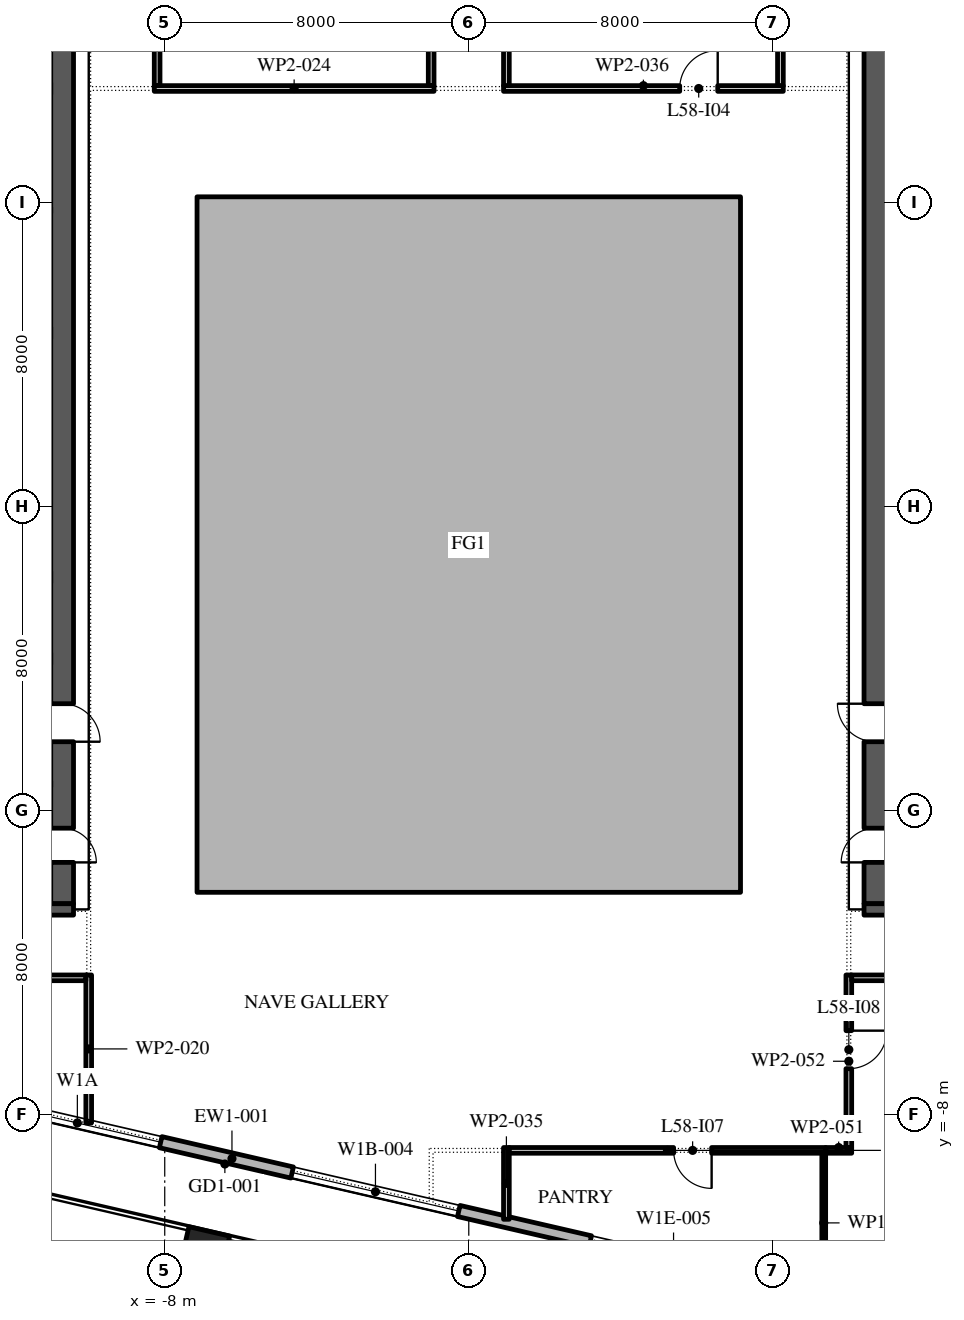
"""IFC4 building model, lengths in metres.
Left out: names, types, materials, properties, quantities, classifications, styles, units other than length and angle.
Written with IfcOpenShell. Run it as: python <this file> out.ifc"""

import sys

from ifc_helpers import new_model, si_unit, direction, frame, frame_2d, origin, origin_2d, place, context, subcontext, project, spatial, polyline, rectangle, outline, extrude, element, fill, save


model = new_model("IFC4")
c1 = context("Model", 3, precision=1e-05, world=origin(), true_north=direction((0.0, 1.0)))
c2 = subcontext(c1, "Body", "Model", "MODEL_VIEW")
j1 = project(units=[si_unit("LENGTHUNIT", "METRE"), si_unit("PLANEANGLEUNIT", "RADIAN")], contexts=[c1])
p1 = place(None, origin())
s1 = spatial("IfcSite", under=j1, at=p1, CompositionType="ELEMENT")
p2 = place(p1, origin())
s2 = spatial("IfcBuilding", under=s1, at=p2, CompositionType="ELEMENT")
p3 = place(p2, frame((0.0, 0.0, 268.2)))
s3 = spatial("IfcBuildingStorey", under=s2, at=p3, CompositionType="ELEMENT", Elevation=268.2)
p4 = place(p3, frame((-6.951, -11.608, 0.0), z_axis=(0.0, 0.0, 1.0), x_axis=(0.974370064785, -0.224951054344, 0.0)))
e1 = element("IfcColumn", 1, at=p4, inside=s3, PredefinedType="COLUMN", context=c2, shape_type="SweptSolid", body=[
    extrude(rectangle(XDim=1.1, YDim=1.1, at=origin_2d()), origin(), (0.0, 0.0, 1.0), 4.2),
])
p5 = place(p3, origin())
e2 = element("IfcWall", 2, at=p5, inside=s3, PredefinedType="STANDARD", context=c2, shape_type="SweptSolid", body=[
    extrude(outline(polyline([(-7.15, -2.15), (7.15, -2.15), (7.15, 16.15), (-7.15, 16.15), (-7.15, -2.15)]), holes=[polyline([(-7.0, -2.0), (-7.0, 16.0), (7.0, 16.0), (7.0, -2.0), (-7.0, -2.0)])]), origin(), (0.0, 0.0, 1.0), 4.0),
])
p6 = place(p3, frame((-29.616, -3.758, 0.0), z_axis=(0.0, 0.0, 1.0), x_axis=(0.974370532314, -0.224949029246, 0.0)))
e3 = element("IfcWall", 3, at=p6, inside=s3, PredefinedType="STANDARD", context=c2, shape_type="SweptSolid", body=[
    extrude(rectangle(XDim=48.0, YDim=0.3, at=frame_2d((24.0, 0.0))), origin(), (0.0, 0.0, 1.0), 4.0),
])
p7 = place(p6, frame((1.625, 0.0, 0.45)))
e4 = element("IfcOpeningElement", 4, at=p7, cuts=e3, PredefinedType="OPENING", context=c2, shape_type="SweptSolid", body=[
    extrude(rectangle(XDim=4.5, YDim=3.05, at=frame_2d((2.25, 1.525))), frame((0.0, 0.16, 0.0), z_axis=(0.0, -1.0, 0.0), x_axis=(1.0, 0.0, 0.0)), (0.0, 0.0, 1.0), 0.32),
])
p8 = place(p6, frame((10.575, 0.0, 0.0)))
e5 = element("IfcOpeningElement", 5, at=p8, cuts=e3, PredefinedType="OPENING", context=c2, shape_type="SweptSolid", body=[
    extrude(rectangle(XDim=2.4, YDim=3.5, at=frame_2d((1.2, 1.75))), frame((0.0, 0.16, 0.0), z_axis=(0.0, -1.0, 0.0), x_axis=(1.0, 0.0, 0.0)), (0.0, 0.0, 1.0), 0.32),
])
p9 = place(p6, frame((17.575, 0.0, 0.45)))
e6 = element("IfcOpeningElement", 6, at=p9, cuts=e3, PredefinedType="OPENING", context=c2, shape_type="SweptSolid", body=[
    extrude(rectangle(XDim=4.5, YDim=3.0, at=frame_2d((2.25, 1.5))), frame((0.0, 0.16, 0.0), z_axis=(0.0, -1.0, 0.0), x_axis=(1.0, 0.0, 0.0)), (0.0, 0.0, 1.0), 0.32),
])
p10 = place(p6, frame((25.625, 0.0, 0.45)))
e7 = element("IfcOpeningElement", 7, at=p10, cuts=e3, PredefinedType="OPENING", context=c2, shape_type="SweptSolid", body=[
    extrude(rectangle(XDim=4.5, YDim=2.95, at=frame_2d((2.25, 1.475))), frame((0.0, 0.16, 0.0), z_axis=(0.0, -1.0, 0.0), x_axis=(1.0, 0.0, 0.0)), (0.0, 0.0, 1.0), 0.32),
])
p11 = place(p6, frame((33.675, 0.0, 0.45)))
e8 = element("IfcOpeningElement", 8, at=p11, cuts=e3, PredefinedType="OPENING", context=c2, shape_type="SweptSolid", body=[
    extrude(rectangle(XDim=4.5, YDim=2.825, at=frame_2d((2.25, 1.413))), frame((0.0, 0.16, 0.0), z_axis=(0.0, -1.0, 0.0), x_axis=(1.0, 0.0, 0.0)), (0.0, 0.0, 1.0), 0.32),
])
p12 = place(p6, frame((42.175, 0.0, 0.0)))
e9 = element("IfcOpeningElement", 9, at=p12, cuts=e3, PredefinedType="OPENING", context=c2, shape_type="SweptSolid", body=[
    extrude(rectangle(XDim=2.4, YDim=3.5, at=frame_2d((1.2, 1.75))), frame((0.0, 0.16, 0.0), z_axis=(0.0, -1.0, 0.0), x_axis=(1.0, 0.0, 0.0)), (0.0, 0.0, 1.0), 0.32),
])
p13 = place(p3, frame((-10.7, -2.45, 0.0), z_axis=(0.0, 0.0, 1.0), x_axis=(0.0, 1.0, 0.0)))
e10 = element("IfcWall", 10, at=p13, inside=s3, PredefinedType="SHEAR", context=c2, shape_type="SweptSolid", body=[
    extrude(rectangle(XDim=27.9, YDim=0.6, at=frame_2d((13.95, 0.0))), origin(), (0.0, 0.0, 1.0), 4.0),
])
p14 = place(p13, frame((23.65, 0.0, 0.0)))
e11 = element("IfcOpeningElement", 11, at=p14, cuts=e10, PredefinedType="OPENING", context=c2, shape_type="SweptSolid", body=[
    extrude(rectangle(XDim=2.4, YDim=2.1, at=frame_2d((1.2, 1.05))), frame((0.0, 0.31, 0.0), z_axis=(0.0, -1.0, 0.0), x_axis=(1.0, 0.0, 0.0)), (0.0, 0.0, 1.0), 0.62),
])
p15 = place(p13, frame((1.087, 0.0, 0.0)))
e12 = element("IfcOpeningElement", 12, at=p15, cuts=e10, PredefinedType="OPENING", context=c2, shape_type="SweptSolid", body=[
    extrude(rectangle(XDim=0.9, YDim=2.1, at=frame_2d((0.45, 1.05))), frame((0.0, 0.31, 0.0), z_axis=(0.0, -1.0, 0.0), x_axis=(1.0, 0.0, 0.0)), (0.0, 0.0, 1.0), 0.62),
])
p16 = place(p13, frame((4.262, 0.0, 0.0)))
e13 = element("IfcOpeningElement", 13, at=p16, cuts=e10, PredefinedType="OPENING", context=c2, shape_type="SweptSolid", body=[
    extrude(rectangle(XDim=1.0, YDim=2.1, at=frame_2d((0.5, 1.05))), frame((0.0, 0.31, 0.0), z_axis=(0.0, -1.0, 0.0), x_axis=(1.0, 0.0, 0.0)), (0.0, 0.0, 1.0), 0.62),
])
p17 = place(p3, frame((-21.6, -2.6, 0.0), z_axis=(0.0, 0.0, 1.0), x_axis=(1.0, 0.0, 0.0)))
e14 = element("IfcWall", 14, at=p17, inside=s3, PredefinedType="SHEAR", context=c2, shape_type="SweptSolid", body=[
    extrude(rectangle(XDim=11.2, YDim=0.3, at=frame_2d((5.6, 0.0))), origin(), (0.0, 0.0, 1.0), 4.0),
])
p18 = place(p3, frame((10.7, -2.45, 0.0), z_axis=(0.0, 0.0, 1.0), x_axis=(0.0, 1.0, 0.0)))
e15 = element("IfcWall", 15, at=p18, inside=s3, PredefinedType="SHEAR", context=c2, shape_type="SweptSolid", body=[
    extrude(rectangle(XDim=27.9, YDim=0.6, at=frame_2d((13.95, 0.0))), origin(), (0.0, 0.0, 1.0), 4.0),
])
p19 = place(p18, frame((23.65, 0.0, 0.0)))
e16 = element("IfcOpeningElement", 16, at=p19, cuts=e15, PredefinedType="OPENING", context=c2, shape_type="SweptSolid", body=[
    extrude(rectangle(XDim=2.4, YDim=2.1, at=frame_2d((1.2, 1.05))), frame((0.0, 0.31, 0.0), z_axis=(0.0, -1.0, 0.0), x_axis=(1.0, 0.0, 0.0)), (0.0, 0.0, 1.0), 0.62),
])
p20 = place(p18, frame((1.087, 0.0, 0.0)))
e17 = element("IfcOpeningElement", 17, at=p20, cuts=e15, PredefinedType="OPENING", context=c2, shape_type="SweptSolid", body=[
    extrude(rectangle(XDim=0.9, YDim=2.1, at=frame_2d((0.45, 1.05))), frame((0.0, 0.31, 0.0), z_axis=(0.0, -1.0, 0.0), x_axis=(1.0, 0.0, 0.0)), (0.0, 0.0, 1.0), 0.62),
])
p21 = place(p18, frame((4.262, 0.0, 0.0)))
e18 = element("IfcOpeningElement", 18, at=p21, cuts=e15, PredefinedType="OPENING", context=c2, shape_type="SweptSolid", body=[
    extrude(rectangle(XDim=1.0, YDim=2.1, at=frame_2d((0.5, 1.05))), frame((0.0, 0.31, 0.0), z_axis=(0.0, -1.0, 0.0), x_axis=(1.0, 0.0, 0.0)), (0.0, 0.0, 1.0), 0.62),
])
p22 = place(p3, frame((10.4, -2.6, 0.0), z_axis=(0.0, 0.0, 1.0), x_axis=(1.0, 0.0, 0.0)))
e19 = element("IfcWall", 19, at=p22, inside=s3, PredefinedType="SHEAR", context=c2, shape_type="SweptSolid", body=[
    extrude(rectangle(XDim=11.2, YDim=0.3, at=frame_2d((5.6, 0.0))), origin(), (0.0, 0.0, 1.0), 4.0),
])
p23 = place(p3, frame((-10.0, -8.216, 0.0), z_axis=(0.0, 0.0, 1.0), x_axis=(0.0, 1.0, 0.0)))
e20 = element("IfcWall", 20, at=p23, inside=s3, PredefinedType="PARTITIONING", context=c2, shape_type="SweptSolid", body=[
    extrude(rectangle(XDim=3.891, YDim=0.15, at=frame_2d((1.946, 0.0))), origin(), (0.0, 0.0, 1.0), 4.0),
])
p24 = place(p3, frame((-10.075, -4.4, 0.0), z_axis=(0.0, 0.0, 1.0), x_axis=(-1.0, 0.0, 0.0)))
e21 = element("IfcWall", 21, at=p24, inside=s3, PredefinedType="PARTITIONING", context=c2, shape_type="SweptSolid", body=[
    extrude(rectangle(XDim=13.64, YDim=0.15, at=frame_2d((6.82, 0.0))), origin(), (0.0, 0.0, 1.0), 4.0),
])
p25 = place(p24, frame((9.065, 0.0, 0.0)))
e22 = element("IfcOpeningElement", 22, at=p25, cuts=e21, PredefinedType="OPENING", context=c2, shape_type="SweptSolid", body=[
    extrude(rectangle(XDim=1.0, YDim=2.1, at=frame_2d((0.5, 1.05))), frame((0.0, 0.085, 0.0), z_axis=(0.0, -1.0, 0.0), x_axis=(1.0, 0.0, 0.0)), (0.0, 0.0, 1.0), 0.17),
])
p26 = place(p3, frame((-8.275, 19.0, 0.0), z_axis=(0.0, 0.0, 1.0), x_axis=(1.0, 0.0, 0.0)))
e23 = element("IfcWall", 23, at=p26, inside=s3, PredefinedType="PARTITIONING", context=c2, shape_type="SweptSolid", body=[
    extrude(rectangle(XDim=7.36, YDim=0.15, at=frame_2d((3.68, 0.0))), origin(), (0.0, 0.0, 1.0), 4.0),
])
p27 = place(p3, frame((-8.2, 29.71, 0.0), z_axis=(0.0, 0.0, 1.0), x_axis=(0.0, -1.0, 0.0)))
e24 = element("IfcWall", 24, at=p27, inside=s3, PredefinedType="PARTITIONING", context=c2, shape_type="SweptSolid", body=[
    extrude(rectangle(XDim=10.635, YDim=0.15, at=frame_2d((5.317, 0.0))), origin(), (0.0, 0.0, 1.0), 4.0),
])
p28 = place(p27, frame((2.81, 0.0, 0.0)))
e25 = element("IfcOpeningElement", 25, at=p28, cuts=e24, PredefinedType="OPENING", context=c2, shape_type="SweptSolid", body=[
    extrude(rectangle(XDim=1.0, YDim=2.1, at=frame_2d((0.5, 1.05))), frame((0.0, 0.085, 0.0), z_axis=(0.0, -1.0, 0.0), x_axis=(1.0, 0.0, 0.0)), (0.0, 0.0, 1.0), 0.17),
])
p29 = place(p3, frame((-0.99, 19.075, 0.0), z_axis=(0.0, 0.0, 1.0), x_axis=(0.0, 1.0, 0.0)))
e26 = element("IfcWall", 26, at=p29, inside=s3, PredefinedType="PARTITIONING", context=c2, shape_type="SweptSolid", body=[
    extrude(rectangle(XDim=10.535, YDim=0.15, at=frame_2d((5.268, 0.0))), origin(), (0.0, 0.0, 1.0), 4.0),
])
p30 = place(p3, frame((0.99, -8.865, 0.0), z_axis=(0.0, 0.0, 1.0), x_axis=(0.0, -1.0, 0.0)))
e27 = element("IfcWall", 27, at=p30, inside=s3, PredefinedType="PARTITIONING", context=c2, shape_type="SweptSolid", body=[
    extrude(rectangle(XDim=1.888, YDim=0.15, at=frame_2d((0.944, 0.0))), origin(), (0.0, 0.0, 1.0), 4.0),
])
p31 = place(p3, frame((0.915, 19.0, 0.0), z_axis=(0.0, 0.0, 1.0), x_axis=(1.0, 0.0, 0.0)))
e28 = element("IfcWall", 28, at=p31, inside=s3, PredefinedType="PARTITIONING", context=c2, shape_type="SweptSolid", body=[
    extrude(rectangle(XDim=7.36, YDim=0.15, at=frame_2d((3.68, 0.0))), origin(), (0.0, 0.0, 1.0), 4.0),
])
p32 = place(p31, frame((4.635, 0.0, 0.0)))
e29 = element("IfcOpeningElement", 29, at=p32, cuts=e28, PredefinedType="OPENING", context=c2, shape_type="SweptSolid", body=[
    extrude(rectangle(XDim=1.0, YDim=2.1, at=frame_2d((0.5, 1.05))), frame((0.0, 0.085, 0.0), z_axis=(0.0, -1.0, 0.0), x_axis=(1.0, 0.0, 0.0)), (0.0, 0.0, 1.0), 0.17),
])
p33 = place(p3, frame((0.99, 24.5, 0.0), z_axis=(0.0, 0.0, 1.0), x_axis=(0.0, -1.0, 0.0)))
e30 = element("IfcWall", 30, at=p33, inside=s3, PredefinedType="PARTITIONING", context=c2, shape_type="SweptSolid", body=[
    extrude(rectangle(XDim=5.425, YDim=0.15, at=frame_2d((2.712, 0.0))), origin(), (0.0, 0.0, 1.0), 4.0),
])
p34 = place(p3, frame((8.2, 19.075, 0.0), z_axis=(0.0, 0.0, 1.0), x_axis=(0.0, 1.0, 0.0)))
e31 = element("IfcWall", 31, at=p34, inside=s3, PredefinedType="PARTITIONING", context=c2, shape_type="SweptSolid", body=[
    extrude(rectangle(XDim=5.375, YDim=0.15, at=frame_2d((2.688, 0.0))), origin(), (0.0, 0.0, 1.0), 4.0),
])
p35 = place(p3, frame((9.39, -8.94, 0.0), z_axis=(0.0, 0.0, 1.0), x_axis=(-1.0, 0.0, 0.0)))
e32 = element("IfcWall", 32, at=p35, inside=s3, PredefinedType="PARTITIONING", context=c2, shape_type="SweptSolid", body=[
    extrude(rectangle(XDim=8.325, YDim=0.15, at=frame_2d((4.163, 0.0))), origin(), (0.0, 0.0, 1.0), 4.0),
])
p36 = place(p35, frame((3.0, 0.0, 0.0)))
e33 = element("IfcOpeningElement", 33, at=p36, cuts=e32, PredefinedType="OPENING", context=c2, shape_type="SweptSolid", body=[
    extrude(rectangle(XDim=1.0, YDim=2.1, at=frame_2d((0.5, 1.05))), frame((0.0, 0.085, 0.0), z_axis=(0.0, -1.0, 0.0), x_axis=(1.0, 0.0, 0.0)), (0.0, 0.0, 1.0), 0.17),
])
p37 = place(p3, frame((9.34, -9.015, 0.0), z_axis=(0.0, 0.0, 1.0), x_axis=(0.0, -1.0, 0.0)))
e34 = element("IfcWall", 34, at=p37, inside=s3, PredefinedType="PARTITIONING", context=c2, shape_type="SweptSolid", body=[
    extrude(rectangle(XDim=3.666, YDim=0.1, at=frame_2d((1.833, 0.0))), origin(), (0.0, 0.0, 1.0), 4.0),
])
p38 = place(p3, frame((10.075, -8.94, 0.0), z_axis=(0.0, 0.0, 1.0), x_axis=(-1.0, 0.0, 0.0)))
e35 = element("IfcWall", 35, at=p38, inside=s3, PredefinedType="PARTITIONING", context=c2, shape_type="SweptSolid", body=[
    extrude(rectangle(XDim=0.685, YDim=0.15, at=frame_2d((0.343, 0.0))), origin(), (0.0, 0.0, 1.0), 4.0),
])
p39 = place(p3, frame((10.0, -4.325, 0.0), z_axis=(0.0, 0.0, 1.0), x_axis=(0.0, -1.0, 0.0)))
e36 = element("IfcWall", 36, at=p39, inside=s3, PredefinedType="PARTITIONING", context=c2, shape_type="SweptSolid", body=[
    extrude(rectangle(XDim=4.54, YDim=0.15, at=frame_2d((2.27, 0.0))), origin(), (0.0, 0.0, 1.0), 4.0),
])
p40 = place(p39, frame((1.465, 0.0, 0.0)))
e37 = element("IfcOpeningElement", 37, at=p40, cuts=e36, PredefinedType="OPENING", context=c2, shape_type="SweptSolid", body=[
    extrude(rectangle(XDim=1.0, YDim=2.1, at=frame_2d((0.5, 1.05))), frame((0.0, 0.085, 0.0), z_axis=(0.0, -1.0, 0.0), x_axis=(1.0, 0.0, 0.0)), (0.0, 0.0, 1.0), 0.17),
])
p41 = place(p3, frame((14.19, -4.4, 0.0), z_axis=(0.0, 0.0, 1.0), x_axis=(-1.0, 0.0, 0.0)))
e38 = element("IfcWall", 38, at=p41, inside=s3, PredefinedType="PARTITIONING", context=c2, shape_type="SweptSolid", body=[
    extrude(rectangle(XDim=4.115, YDim=0.15, at=frame_2d((2.058, 0.0))), origin(), (0.0, 0.0, 1.0), 4.0),
])
p42 = place(p9, origin())
e39 = element("IfcWindow", 39, at=p42, inside=s3, PartitioningType="DOUBLE_PANEL_VERTICAL", PredefinedType="WINDOW", context=c2, shape_type="SweptSolid", body=[
    extrude(rectangle(XDim=4.5, YDim=3.0, at=frame_2d((2.25, 1.5))), frame((0.0, 0.03, 0.0), z_axis=(0.0, -1.0, 0.0), x_axis=(1.0, 0.0, 0.0)), (0.0, 0.0, 1.0), 0.06),
])
fill(e6, e39)
p43 = place(p10, origin())
e40 = element("IfcWindow", 40, at=p43, inside=s3, PartitioningType="DOUBLE_PANEL_VERTICAL", PredefinedType="WINDOW", context=c2, shape_type="SweptSolid", body=[
    extrude(rectangle(XDim=4.5, YDim=2.95, at=frame_2d((2.25, 1.475))), frame((0.0, 0.03, 0.0), z_axis=(0.0, -1.0, 0.0), x_axis=(1.0, 0.0, 0.0)), (0.0, 0.0, 1.0), 0.06),
])
fill(e7, e40)
p44 = place(p32, origin())
e41 = element("IfcDoor", 41, at=p44, inside=s3, OperationType="SINGLE_SWING_LEFT", PredefinedType="DOOR", context=c2, shape_type="SweptSolid", body=[
    extrude(rectangle(XDim=1.0, YDim=2.1, at=frame_2d((0.5, 1.05))), frame((0.0, 0.025, 0.0), z_axis=(0.0, -1.0, 0.0), x_axis=(1.0, 0.0, 0.0)), (0.0, 0.0, 1.0), 0.05),
])
fill(e29, e41)
p45 = place(p36, origin())
e42 = element("IfcDoor", 42, at=p45, inside=s3, OperationType="SINGLE_SWING_RIGHT", PredefinedType="DOOR", context=c2, shape_type="SweptSolid", body=[
    extrude(rectangle(XDim=1.0, YDim=2.1, at=frame_2d((0.5, 1.05))), frame((0.0, 0.025, 0.0), z_axis=(0.0, -1.0, 0.0), x_axis=(1.0, 0.0, 0.0)), (0.0, 0.0, 1.0), 0.05),
])
fill(e33, e42)
p46 = place(p40, origin())
e43 = element("IfcDoor", 43, at=p46, inside=s3, OperationType="SINGLE_SWING_RIGHT", PredefinedType="DOOR", context=c2, shape_type="SweptSolid", body=[
    extrude(rectangle(XDim=1.0, YDim=2.1, at=frame_2d((0.5, 1.05))), frame((0.0, 0.025, 0.0), z_axis=(0.0, -1.0, 0.0), x_axis=(1.0, 0.0, 0.0)), (0.0, 0.0, 1.0), 0.05),
])
fill(e37, e43)
save(model, sys.argv[1])
